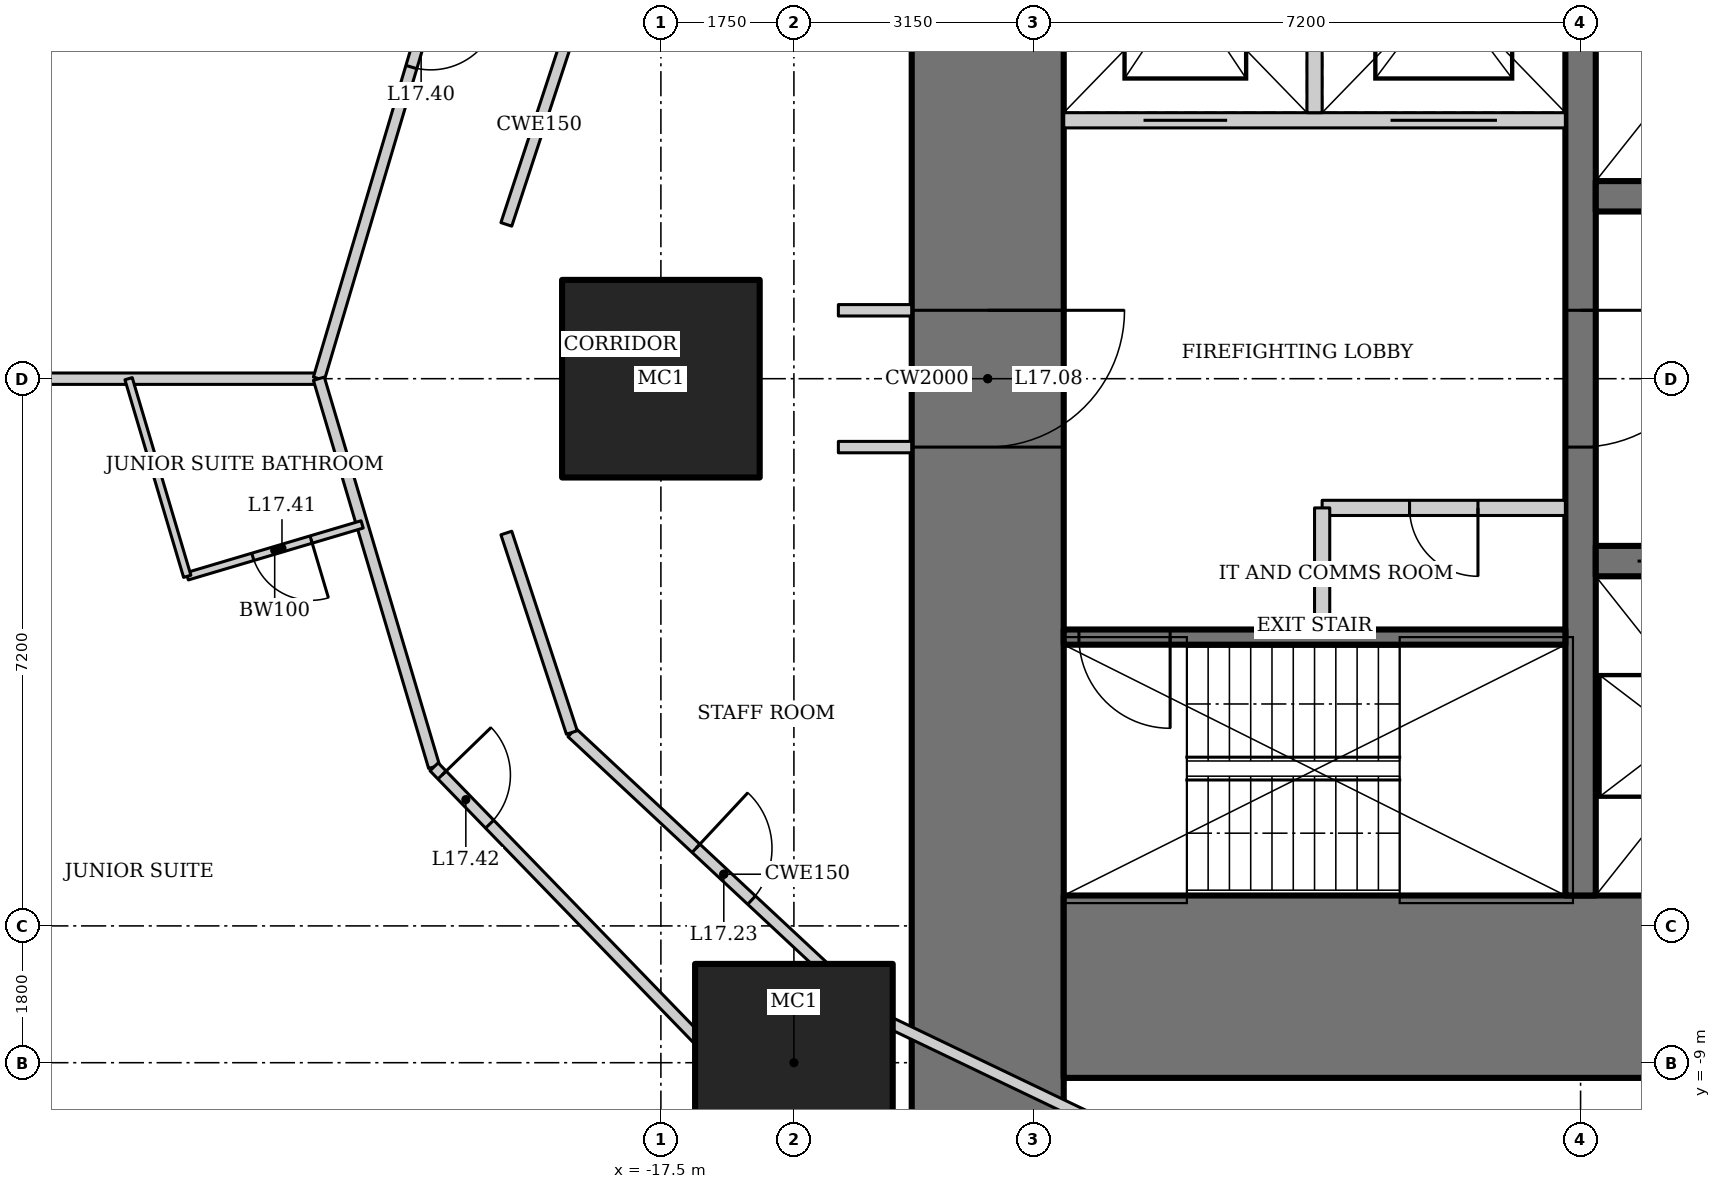
"""IFC4 building model, lengths in metres.
Left out: names, types, materials, properties, quantities, classifications, styles, units other than length and angle.
Written with IfcOpenShell. Run it as: python <this file> out.ifc"""

import sys

from ifc_helpers import new_model, si_unit, direction, frame, frame_2d, origin, origin_2d, place, context, subcontext, project, spatial, rectangle, hollow_rectangle, extrude, element, fill, save


model = new_model("IFC4")
c1 = context("Model", 3, precision=1e-05, world=origin(), true_north=direction((0.0, 1.0)))
c2 = subcontext(c1, "Body", "Model", "MODEL_VIEW")
j1 = project(units=[si_unit("LENGTHUNIT", "METRE"), si_unit("PLANEANGLEUNIT", "RADIAN")], contexts=[c1])
p1 = place(None, origin())
s1 = spatial("IfcSite", under=j1, at=p1, CompositionType="ELEMENT")
p2 = place(p1, origin())
s2 = spatial("IfcBuilding", under=s1, at=p2, CompositionType="ELEMENT")
p3 = place(p2, frame((0.0, 0.0, 76.6)))
s3 = spatial("IfcBuildingStorey", under=s2, at=p3, CompositionType="ELEMENT", Elevation=76.6)
for number, where, z_axis, x_axis in (
    (1, (-17.5, 0.0, 0.0), (0.0, 0.0, 1.0), (1.0, 0.0, 0.0)),
    (2, (-15.75, -9.0, 0.0), (0.0, 0.0, 1.0), (1.0, 0.0, 0.0)),
):
    element("IfcColumn", number, at=place(p3, frame(where, z_axis=z_axis, x_axis=x_axis)), inside=s3, PredefinedType="COLUMN", context=c2, shape_type="SweptSolid", body=[
        extrude(hollow_rectangle(XDim=2.6, YDim=2.6, WallThickness=0.13, at=origin_2d()), origin(), (0.0, 0.0, 1.0), 3.6),
    ])
p4 = place(p3, frame((-13.2, 13.0, 0.0), z_axis=(0.0, 0.0, 1.0), x_axis=(0.0, -1.0, 0.0)))
e3 = element("IfcWall", 3, at=p4, inside=s3, PredefinedType="SHEAR", context=c2, shape_type="SweptSolid", body=[
    extrude(rectangle(XDim=26.0, YDim=2.0, at=frame_2d((13.0, 0.0))), origin(), (0.0, 0.0, 1.0), 3.6),
])
p5 = place(p4, frame((12.1, 0.0, 0.0)))
e4 = element("IfcOpeningElement", 4, at=p5, cuts=e3, PredefinedType="OPENING", context=c2, shape_type="SweptSolid", body=[
    extrude(rectangle(XDim=1.8, YDim=2.1, at=frame_2d((0.9, 1.05))), frame((0.0, 1.01, 0.0), z_axis=(0.0, -1.0, 0.0), x_axis=(1.0, 0.0, 0.0)), (0.0, 0.0, 1.0), 2.02),
])
p6 = place(p3, frame((-12.2, -8.0, 0.0), z_axis=(0.0, 0.0, 1.0), x_axis=(1.0, 0.0, 0.0)))
e5 = element("IfcWall", 5, at=p6, inside=s3, PredefinedType="SHEAR", context=c2, shape_type="SweptSolid", body=[
    extrude(rectangle(XDim=24.4, YDim=2.4, at=frame_2d((12.2, 0.0))), origin(), (0.0, 0.0, 1.0), 3.6),
])
p7 = place(p3, frame((-5.4, 6.8, 0.0), z_axis=(0.0, 0.0, 1.0), x_axis=(0.0, -1.0, 0.0)))
e6 = element("IfcWall", 6, at=p7, inside=s3, PredefinedType="SHEAR", context=c2, shape_type="SweptSolid", body=[
    extrude(rectangle(XDim=13.6, YDim=0.4, at=frame_2d((6.8, 0.0))), origin(), (0.0, 0.0, 1.0), 3.6),
])
p8 = place(p7, frame((5.9, 0.0, 0.0)))
e7 = element("IfcOpeningElement", 7, at=p8, cuts=e6, PredefinedType="OPENING", context=c2, shape_type="SweptSolid", body=[
    extrude(rectangle(XDim=1.8, YDim=2.1, at=frame_2d((0.9, 1.05))), frame((0.0, 0.21, 0.0), z_axis=(0.0, -1.0, 0.0), x_axis=(1.0, 0.0, 0.0)), (0.0, 0.0, 1.0), 0.42),
])
p9 = place(p3, frame((-5.2, -2.4, 0.0), z_axis=(0.0, 0.0, 1.0), x_axis=(1.0, 0.0, 0.0)))
e8 = element("IfcWall", 8, at=p9, inside=s3, PredefinedType="SHEAR", context=c2, shape_type="SweptSolid", body=[
    extrude(rectangle(XDim=10.4, YDim=0.4, at=frame_2d((5.2, 0.0))), origin(), (0.0, 0.0, 1.0), 3.6),
])
p10 = place(p9, frame((0.55, 0.0, 0.0)))
e9 = element("IfcOpeningElement", 9, at=p10, cuts=e8, PredefinedType="OPENING", context=c2, shape_type="SweptSolid", body=[
    extrude(rectangle(XDim=1.1, YDim=2.2, at=frame_2d((0.55, 1.1))), frame((0.0, 0.21, 0.0), z_axis=(0.0, -1.0, 0.0), x_axis=(1.0, 0.0, 0.0)), (0.0, 0.0, 1.0), 0.42),
])
p11 = place(p9, frame((4.083, 0.0, 0.0)))
e10 = element("IfcOpeningElement", 10, at=p11, cuts=e8, PredefinedType="OPENING", context=c2, shape_type="SweptSolid", body=[
    extrude(rectangle(XDim=1.1, YDim=2.2, at=frame_2d((0.55, 1.1))), frame((0.0, 0.21, 0.0), z_axis=(0.0, -1.0, 0.0), x_axis=(1.0, 0.0, 0.0)), (0.0, 0.0, 1.0), 0.42),
])
p12 = place(p9, frame((7.617, 0.0, 0.0)))
e11 = element("IfcOpeningElement", 11, at=p12, cuts=e8, PredefinedType="OPENING", context=c2, shape_type="SweptSolid", body=[
    extrude(rectangle(XDim=1.1, YDim=2.2, at=frame_2d((0.55, 1.1))), frame((0.0, 0.21, 0.0), z_axis=(0.0, -1.0, 0.0), x_axis=(1.0, 0.0, 0.0)), (0.0, 0.0, 1.0), 0.42),
])
p13 = place(p3, frame((5.2, 2.4, 0.0), z_axis=(0.0, 0.0, 1.0), x_axis=(-1.0, 0.0, 0.0)))
e12 = element("IfcWall", 12, at=p13, inside=s3, PredefinedType="SHEAR", context=c2, shape_type="SweptSolid", body=[
    extrude(rectangle(XDim=10.4, YDim=0.4, at=frame_2d((5.2, 0.0))), origin(), (0.0, 0.0, 1.0), 3.6),
])
p14 = place(p3, frame((-5.6, -3.4, 0.0), z_axis=(0.0, 0.0, 1.0), x_axis=(-1.0, 0.0, 0.0)))
e13 = element("IfcWall", 13, at=p14, inside=s3, PredefinedType="SHEAR", context=c2, shape_type="SweptSolid", body=[
    extrude(rectangle(XDim=6.6, YDim=0.2, at=frame_2d((3.3, 0.0))), origin(), (0.0, 0.0, 1.0), 3.6),
])
p15 = place(p14, frame((5.2, 0.0, 0.0)))
e14 = element("IfcOpeningElement", 14, at=p15, cuts=e13, PredefinedType="OPENING", context=c2, shape_type="SweptSolid", body=[
    extrude(rectangle(XDim=1.2, YDim=2.1, at=frame_2d((0.6, 1.05))), frame((0.0, 0.11, 0.0), z_axis=(0.0, -1.0, 0.0), x_axis=(1.0, 0.0, 0.0)), (0.0, 0.0, 1.0), 0.22),
])
p16 = place(p3, frame((-12.2, 3.4, 0.0), z_axis=(0.0, 0.0, 1.0), x_axis=(1.0, 0.0, 0.0)))
e15 = element("IfcWall", 15, at=p16, inside=s3, PredefinedType="SOLIDWALL", context=c2, shape_type="SweptSolid", body=[
    extrude(rectangle(XDim=6.6, YDim=0.2, at=frame_2d((3.3, 0.0))), origin(), (0.0, 0.0, 1.0), 3.6),
])
p17 = place(p16, frame((1.05, 0.0, 0.0)))
e16 = element("IfcOpeningElement", 16, at=p17, cuts=e15, PredefinedType="OPENING", context=c2, shape_type="SweptSolid", body=[
    extrude(rectangle(XDim=1.1, YDim=2.2, at=frame_2d((0.55, 1.1))), frame((0.0, 0.11, 0.0), z_axis=(0.0, -1.0, 0.0), x_axis=(1.0, 0.0, 0.0)), (0.0, 0.0, 1.0), 0.22),
])
p18 = place(p16, frame((4.3, 0.0, 0.0)))
e17 = element("IfcOpeningElement", 17, at=p18, cuts=e15, PredefinedType="OPENING", context=c2, shape_type="SweptSolid", body=[
    extrude(rectangle(XDim=1.4, YDim=2.2, at=frame_2d((0.7, 1.1))), frame((0.0, 0.11, 0.0), z_axis=(0.0, -1.0, 0.0), x_axis=(1.0, 0.0, 0.0)), (0.0, 0.0, 1.0), 0.22),
])
p19 = place(p3, frame((-8.9, 3.5, 0.0), z_axis=(0.0, 0.0, 1.0), x_axis=(0.0, 1.0, 0.0)))
e18 = element("IfcWall", 18, at=p19, inside=s3, PredefinedType="SOLIDWALL", context=c2, shape_type="SweptSolid", body=[
    extrude(rectangle(XDim=3.3, YDim=0.2, at=frame_2d((1.65, 0.0))), origin(), (0.0, 0.0, 1.0), 3.6),
])
p20 = place(p3, frame((-29.26, -7.2, 0.0), z_axis=(0.0, 0.0, 1.0), x_axis=(0.583937613703, -0.811798536155, 0.0)))
e19 = element("IfcWall", 19, at=p20, inside=s3, PredefinedType="SOLIDWALL", context=c2, shape_type="SweptSolid", body=[
    extrude(rectangle(XDim=8.323, YDim=0.2, at=frame_2d((4.162, 0.0))), origin(), (0.0, 0.0, 1.0), 3.45),
])
p21 = place(p20, frame((1.531, 0.0, 0.5)))
e20 = element("IfcOpeningElement", 20, at=p21, cuts=e19, PredefinedType="OPENING", context=c2, shape_type="SweptSolid", body=[
    extrude(rectangle(XDim=1.5, YDim=2.2, at=frame_2d((0.75, 1.1))), frame((0.0, 0.11, 0.0), z_axis=(0.0, -1.0, 0.0), x_axis=(1.0, 0.0, 0.0)), (0.0, 0.0, 1.0), 0.22),
])
p22 = place(p20, frame((5.292, 0.0, 0.5)))
e21 = element("IfcOpeningElement", 21, at=p22, cuts=e19, PredefinedType="OPENING", context=c2, shape_type="SweptSolid", body=[
    extrude(rectangle(XDim=1.5, YDim=2.2, at=frame_2d((0.75, 1.1))), frame((0.0, 0.11, 0.0), z_axis=(0.0, -1.0, 0.0), x_axis=(1.0, 0.0, 0.0)), (0.0, 0.0, 1.0), 0.22),
])
p23 = place(p3, frame((-5.6, -1.7, 0.0), z_axis=(0.0, 0.0, 1.0), x_axis=(-1.0, 0.0, 0.0)))
e22 = element("IfcWall", 22, at=p23, inside=s3, PredefinedType="SOLIDWALL", context=c2, shape_type="SweptSolid", body=[
    extrude(rectangle(XDim=3.2, YDim=0.2, at=frame_2d((1.6, 0.0))), origin(), (0.0, 0.0, 1.0), 3.45),
])
p24 = place(p23, frame((1.15, 0.0, 0.0)))
e23 = element("IfcOpeningElement", 23, at=p24, cuts=e22, PredefinedType="OPENING", context=c2, shape_type="SweptSolid", body=[
    extrude(rectangle(XDim=0.9, YDim=2.1, at=frame_2d((0.45, 1.05))), frame((0.0, 0.11, 0.0), z_axis=(0.0, -1.0, 0.0), x_axis=(1.0, 0.0, 0.0)), (0.0, 0.0, 1.0), 0.22),
])
p25 = place(p3, frame((-8.8, -1.7, 0.0), z_axis=(0.0, 0.0, 1.0), x_axis=(0.0, -1.0, 0.0)))
e24 = element("IfcWall", 24, at=p25, inside=s3, PredefinedType="SOLIDWALL", context=c2, shape_type="SweptSolid", body=[
    extrude(rectangle(XDim=1.6, YDim=0.2, at=frame_2d((0.8, 0.0))), origin(), (0.0, 0.0, 1.0), 3.45),
])
p26 = place(p3, frame((-30.821, 0.0, 0.0), z_axis=(0.0, 0.0, 1.0), x_axis=(1.0, 0.0, 0.0)))
e25 = element("IfcWall", 25, at=p26, inside=s3, PredefinedType="PARTITIONING", context=c2, shape_type="SweptSolid", body=[
    extrude(rectangle(XDim=8.821, YDim=0.15, at=frame_2d((4.41, 0.0))), origin(), (0.0, 0.0, 1.0), 2.528),
])
p27 = place(p3, frame((-24.435, -13.909, 0.0), z_axis=(0.0, 0.0, 1.0), x_axis=(0.870744406136, 0.491735883563, 0.0)))
e26 = element("IfcWall", 26, at=p27, inside=s3, PredefinedType="PARTITIONING", context=c2, shape_type="SweptSolid", body=[
    extrude(rectangle(XDim=9.263, YDim=0.15, at=frame_2d((4.631, 0.0))), origin(), (0.0, 0.0, 1.0), 2.693),
])
p28 = place(p3, frame((-20.484, 5.107, 0.0), z_axis=(0.0, 0.0, 1.0), x_axis=(-0.284584469409, -0.95865096869, 0.0)))
e27 = element("IfcWall", 27, at=p28, inside=s3, PredefinedType="PARTITIONING", context=c2, shape_type="SweptSolid", body=[
    extrude(rectangle(XDim=5.327, YDim=0.15, at=frame_2d((2.664, 0.0))), origin(), (0.0, 0.0, 1.0), 3.45),
])
p29 = place(p28, frame((0.15, 0.0, 0.0)))
e28 = element("IfcOpeningElement", 28, at=p29, cuts=e27, PredefinedType="OPENING", context=c2, shape_type="SweptSolid", body=[
    extrude(rectangle(XDim=0.9, YDim=2.1, at=frame_2d((0.45, 1.05))), frame((0.0, 0.085, 0.0), z_axis=(0.0, -1.0, 0.0), x_axis=(1.0, 0.0, 0.0)), (0.0, 0.0, 1.0), 0.17),
])
p30 = place(p3, frame((-22.0, 0.0, 0.0), z_axis=(0.0, 0.0, 1.0), x_axis=(0.284584469409, -0.95865096869, 0.0)))
e29 = element("IfcWall", 29, at=p30, inside=s3, PredefinedType="PARTITIONING", context=c2, shape_type="SweptSolid", body=[
    extrude(rectangle(XDim=5.327, YDim=0.15, at=frame_2d((2.664, 0.0))), origin(), (0.0, 0.0, 1.0), 3.45),
])
p31 = place(p3, frame((-20.484, -5.107, 0.0), z_axis=(0.0, 0.0, 1.0), x_axis=(0.695871090686, -0.71816671125, 0.0)))
e30 = element("IfcWall", 30, at=p31, inside=s3, PredefinedType="PARTITIONING", context=c2, shape_type="SweptSolid", body=[
    extrude(rectangle(XDim=5.913, YDim=0.15, at=frame_2d((2.957, 0.0))), origin(), (0.0, 0.0, 1.0), 3.45),
])
p32 = place(p31, frame((0.15, 0.0, 0.0)))
e31 = element("IfcOpeningElement", 31, at=p32, cuts=e30, PredefinedType="OPENING", context=c2, shape_type="SweptSolid", body=[
    extrude(rectangle(XDim=0.9, YDim=2.1, at=frame_2d((0.45, 1.05))), frame((0.0, 0.085, 0.0), z_axis=(0.0, -1.0, 0.0), x_axis=(1.0, 0.0, 0.0)), (0.0, 0.0, 1.0), 0.17),
])
p33 = place(p3, frame((-16.369, -9.354, 0.0), z_axis=(0.0, 0.0, 1.0), x_axis=(0.883334368785, -0.468743419071, 0.0)))
e32 = element("IfcWall", 32, at=p33, inside=s3, PredefinedType="PARTITIONING", context=c2, shape_type="SweptSolid", body=[
    extrude(rectangle(XDim=5.491, YDim=0.15, at=frame_2d((2.746, 0.0))), origin(), (0.0, 0.0, 1.0), 3.45),
])
p34 = place(p3, frame((-18.672, -4.655, 0.0), z_axis=(0.0, 0.0, 1.0), x_axis=(0.731260145007, -0.682098673452, 0.0)))
e33 = element("IfcWall", 33, at=p34, inside=s3, PredefinedType="PARTITIONING", context=c2, shape_type="SweptSolid", body=[
    extrude(rectangle(XDim=5.468, YDim=0.15, at=frame_2d((2.734, 0.0))), origin(), (0.0, 0.0, 1.0), 3.45),
])
p35 = place(p34, frame((2.234, 0.0, 0.0)))
e34 = element("IfcOpeningElement", 34, at=p35, cuts=e33, PredefinedType="OPENING", context=c2, shape_type="SweptSolid", body=[
    extrude(rectangle(XDim=1.0, YDim=2.1, at=frame_2d((0.5, 1.05))), frame((0.0, 0.085, 0.0), z_axis=(0.0, -1.0, 0.0), x_axis=(1.0, 0.0, 0.0)), (0.0, 0.0, 1.0), 0.17),
])
p36 = place(p3, frame((-14.673, -8.385, 0.0), z_axis=(0.0, 0.0, 1.0), x_axis=(0.901869692799, -0.43200816799, 0.0)))
e35 = element("IfcWall", 35, at=p36, inside=s3, PredefinedType="PARTITIONING", context=c2, shape_type="SweptSolid", body=[
    extrude(rectangle(XDim=4.986, YDim=0.15, at=frame_2d((2.493, 0.0))), origin(), (0.0, 0.0, 1.0), 3.45),
])
p37 = place(p3, frame((-21.431, -1.917, 0.0), z_axis=(0.0, 0.0, 1.0), x_axis=(-0.958639927723, -0.284621659356, 0.0)))
e36 = element("IfcWall", 36, at=p37, inside=s3, PredefinedType="PARTITIONING", context=c2, shape_type="SweptSolid", body=[
    extrude(rectangle(XDim=2.4, YDim=0.1, at=frame_2d((1.2, 0.0))), origin(), (0.0, 0.0, 1.0), 3.45),
])
p38 = place(p37, frame((0.7, 0.0, 0.0)))
e37 = element("IfcOpeningElement", 37, at=p38, cuts=e36, PredefinedType="OPENING", context=c2, shape_type="SweptSolid", body=[
    extrude(rectangle(XDim=0.8, YDim=2.1, at=frame_2d((0.4, 1.05))), frame((0.0, 0.06, 0.0), z_axis=(0.0, -1.0, 0.0), x_axis=(1.0, 0.0, 0.0)), (0.0, 0.0, 1.0), 0.12),
])
p39 = place(p3, frame((-23.732, -2.6, 0.0), z_axis=(0.0, 0.0, 1.0), x_axis=(-0.284514277473, 0.958671803025, 0.0)))
e38 = element("IfcWall", 38, at=p39, inside=s3, PredefinedType="PARTITIONING", context=c2, shape_type="SweptSolid", body=[
    extrude(rectangle(XDim=2.712, YDim=0.1, at=frame_2d((1.356, 0.0))), origin(), (0.0, 0.0, 1.0), 3.45),
])
for number, where, z_axis, x_axis in (
    (39, (-18.672, 4.655, 0.0), (0.0, 0.0, 1.0), (-0.312, -0.95, 0.0)),
    (40, (-19.533, -2.03, 0.0), (0.0, 0.0, 1.0), (0.312, -0.95, 0.0)),
):
    element("IfcWall", number, at=place(p3, frame(where, z_axis=z_axis, x_axis=x_axis)), inside=s3, PredefinedType="PARTITIONING", context=c2, shape_type="SweptSolid", body=[
        extrude(rectangle(XDim=2.763, YDim=0.15, at=frame_2d((1.381, 0.0))), origin(), (0.0, 0.0, 1.0), 3.45),
    ])
for number, where, z_axis, x_axis in (
    (41, (-14.2, -0.9, 0.0), (0.0, 0.0, 1.0), (-1.0, 0.0, 0.0)),
    (42, (-14.2, 0.9, 0.0), (0.0, 0.0, 1.0), (-1.0, 0.0, 0.0)),
):
    element("IfcWall", number, at=place(p3, frame(where, z_axis=z_axis, x_axis=x_axis)), inside=s3, PredefinedType="PARTITIONING", context=c2, shape_type="SweptSolid", body=[
        extrude(rectangle(XDim=0.965, YDim=0.15, at=frame_2d((0.482, 0.0))), origin(), (0.0, 0.0, 1.0), 3.45),
    ])
p40 = place(p24, origin())
e43 = element("IfcDoor", 43, at=p40, inside=s3, OperationType="SINGLE_SWING_LEFT", PredefinedType="DOOR", context=c2, shape_type="SweptSolid", body=[
    extrude(rectangle(XDim=0.9, YDim=2.1, at=frame_2d((0.45, 1.05))), frame((0.0, 0.025, 0.0), z_axis=(0.0, -1.0, 0.0), x_axis=(1.0, 0.0, 0.0)), (0.0, 0.0, 1.0), 0.05),
])
fill(e23, e43)
p41 = place(p8, origin())
e44 = element("IfcDoor", 44, at=p41, inside=s3, OperationType="DOUBLE_DOOR_DOUBLE_SWING", PredefinedType="DOOR", context=c2, shape_type="SweptSolid", body=[
    extrude(rectangle(XDim=1.8, YDim=2.1, at=frame_2d((0.9, 1.05))), frame((0.0, 0.025, 0.0), z_axis=(0.0, -1.0, 0.0), x_axis=(1.0, 0.0, 0.0)), (0.0, 0.0, 1.0), 0.05),
])
fill(e7, e44)
p42 = place(p15, origin())
e45 = element("IfcDoor", 45, at=p42, inside=s3, OperationType="SINGLE_SWING_RIGHT", PredefinedType="DOOR", context=c2, shape_type="SweptSolid", body=[
    extrude(rectangle(XDim=1.2, YDim=2.1, at=frame_2d((0.6, 1.05))), frame((0.0, 0.025, 0.0), z_axis=(0.0, -1.0, 0.0), x_axis=(1.0, 0.0, 0.0)), (0.0, 0.0, 1.0), 0.05),
])
fill(e14, e45)
p43 = place(p5, origin())
e46 = element("IfcDoor", 46, at=p43, inside=s3, OperationType="DOUBLE_DOOR_DOUBLE_SWING", PredefinedType="DOOR", context=c2, shape_type="SweptSolid", body=[
    extrude(rectangle(XDim=1.8, YDim=2.1, at=frame_2d((0.9, 1.05))), frame((0.0, 0.025, 0.0), z_axis=(0.0, -1.0, 0.0), x_axis=(1.0, 0.0, 0.0)), (0.0, 0.0, 1.0), 0.05),
])
fill(e4, e46)
p44 = place(p10, origin())
e47 = element("IfcDoor", 47, at=p44, inside=s3, OperationType="DOUBLE_DOOR_SLIDING", PredefinedType="DOOR", context=c2, shape_type="SweptSolid", body=[
    extrude(rectangle(XDim=1.1, YDim=2.2, at=frame_2d((0.55, 1.1))), frame((0.0, 0.025, 0.0), z_axis=(0.0, -1.0, 0.0), x_axis=(1.0, 0.0, 0.0)), (0.0, 0.0, 1.0), 0.05),
])
fill(e9, e47)
p45 = place(p17, origin())
e48 = element("IfcDoor", 48, at=p45, inside=s3, OperationType="DOUBLE_DOOR_SLIDING", PredefinedType="DOOR", context=c2, shape_type="SweptSolid", body=[
    extrude(rectangle(XDim=1.1, YDim=2.2, at=frame_2d((0.55, 1.1))), frame((0.0, 0.025, 0.0), z_axis=(0.0, -1.0, 0.0), x_axis=(1.0, 0.0, 0.0)), (0.0, 0.0, 1.0), 0.05),
])
fill(e16, e48)
p46 = place(p18, origin())
e49 = element("IfcDoor", 49, at=p46, inside=s3, OperationType="DOUBLE_DOOR_SLIDING", PredefinedType="DOOR", context=c2, shape_type="SweptSolid", body=[
    extrude(rectangle(XDim=1.4, YDim=2.2, at=frame_2d((0.7, 1.1))), frame((0.0, 0.025, 0.0), z_axis=(0.0, -1.0, 0.0), x_axis=(1.0, 0.0, 0.0)), (0.0, 0.0, 1.0), 0.05),
])
fill(e17, e49)
p47 = place(p35, origin())
e50 = element("IfcDoor", 50, at=p47, inside=s3, OperationType="SINGLE_SWING_LEFT", PredefinedType="DOOR", context=c2, shape_type="SweptSolid", body=[
    extrude(rectangle(XDim=1.0, YDim=2.1, at=frame_2d((0.5, 1.05))), frame((0.0, 0.025, 0.0), z_axis=(0.0, -1.0, 0.0), x_axis=(1.0, 0.0, 0.0)), (0.0, 0.0, 1.0), 0.05),
])
fill(e34, e50)
p48 = place(p29, origin())
e51 = element("IfcDoor", 51, at=p48, inside=s3, OperationType="SINGLE_SWING_LEFT", PredefinedType="DOOR", context=c2, shape_type="SweptSolid", body=[
    extrude(rectangle(XDim=0.9, YDim=2.1, at=frame_2d((0.45, 1.05))), frame((0.0, 0.025, 0.0), z_axis=(0.0, -1.0, 0.0), x_axis=(1.0, 0.0, 0.0)), (0.0, 0.0, 1.0), 0.05),
])
fill(e28, e51)
p49 = place(p38, origin())
e52 = element("IfcDoor", 52, at=p49, inside=s3, OperationType="SINGLE_SWING_LEFT", PredefinedType="DOOR", context=c2, shape_type="SweptSolid", body=[
    extrude(rectangle(XDim=0.8, YDim=2.1, at=frame_2d((0.4, 1.05))), frame((0.0, 0.025, 0.0), z_axis=(0.0, -1.0, 0.0), x_axis=(1.0, 0.0, 0.0)), (0.0, 0.0, 1.0), 0.05),
])
fill(e37, e52)
p50 = place(p32, origin())
e53 = element("IfcDoor", 53, at=p50, inside=s3, OperationType="SINGLE_SWING_LEFT", PredefinedType="DOOR", context=c2, shape_type="SweptSolid", body=[
    extrude(rectangle(XDim=0.9, YDim=2.1, at=frame_2d((0.45, 1.05))), frame((0.0, 0.025, 0.0), z_axis=(0.0, -1.0, 0.0), x_axis=(1.0, 0.0, 0.0)), (0.0, 0.0, 1.0), 0.05),
])
fill(e31, e53)
save(model, sys.argv[1])
